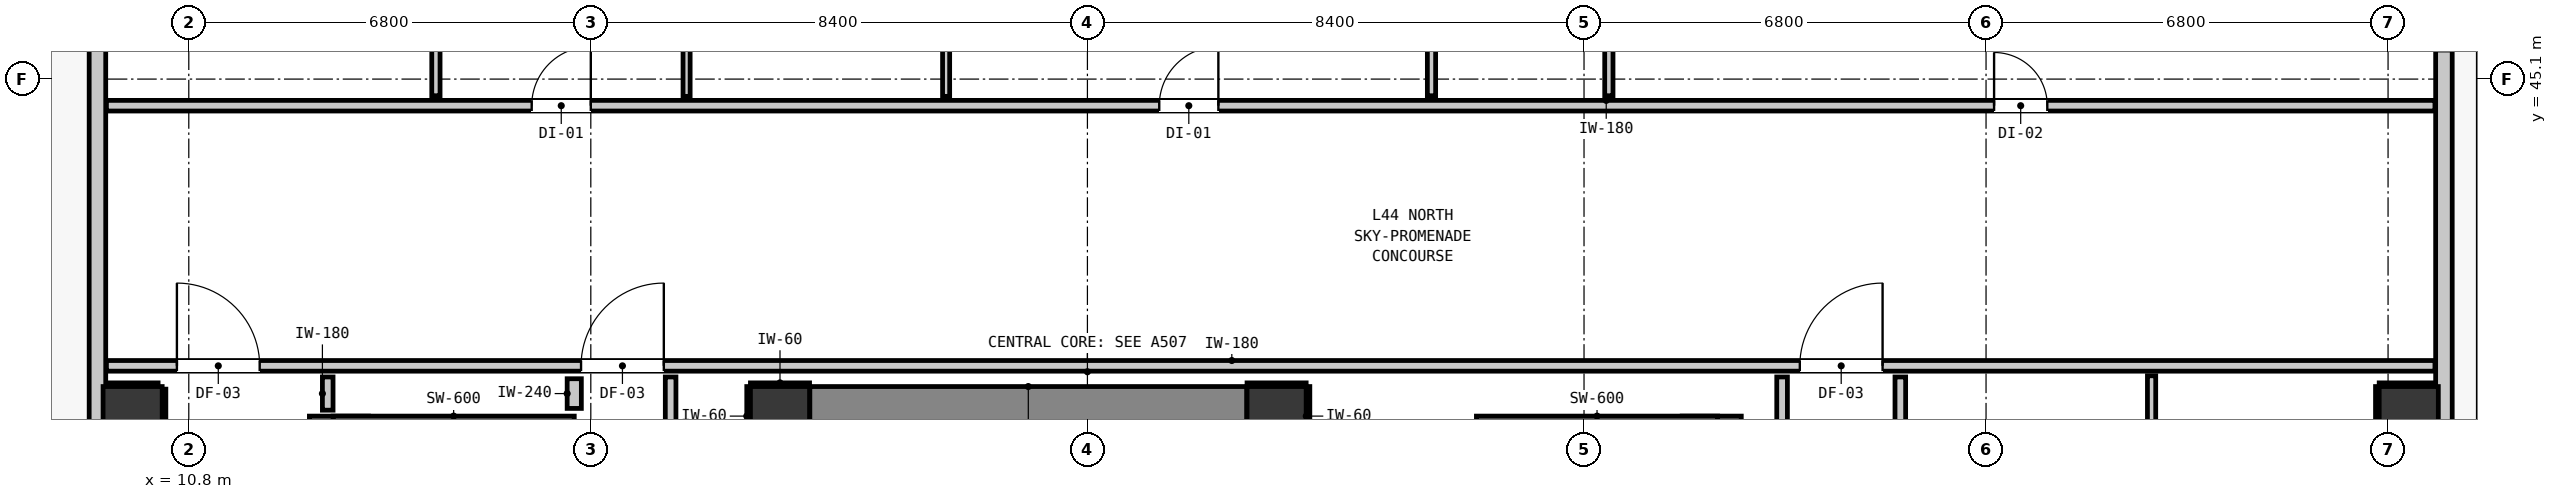
"""IFC4 building model, lengths in metres.
Left out: names, types, materials, properties, quantities, classifications, styles, units other than length and angle.
Written with IfcOpenShell. Run it as: python <this file> out.ifc"""

import sys

from ifc_helpers import new_model, si_unit, direction, frame, frame_2d, origin, origin_2d, place, context, subcontext, project, spatial, rectangle, extrude, element, fill, save


model = new_model("IFC4")
c1 = context("Model", 3, precision=1e-05, world=origin(), true_north=direction((0.0, 1.0)))
c2 = subcontext(c1, "Body", "Model", "MODEL_VIEW")
j1 = project(units=[si_unit("LENGTHUNIT", "METRE"), si_unit("PLANEANGLEUNIT", "RADIAN")], contexts=[c1])
p1 = place(None, origin())
s1 = spatial("IfcSite", under=j1, at=p1, CompositionType="ELEMENT")
p2 = place(p1, origin())
s2 = spatial("IfcBuilding", under=s1, at=p2, CompositionType="ELEMENT")
p3 = place(p2, frame((0.0, 0.0, 152.56)))
s3 = spatial("IfcBuildingStorey", under=s2, at=p3, CompositionType="ELEMENT", Elevation=152.56)
for number, where, z_axis, x_axis in (
    (1, (20.8, 39.4, 0.0), (0.0, 0.0, 1.0), (1.0, 0.0, 0.0)),
    (2, (29.2, 39.4, 0.0), (0.0, 0.0, 1.0), (1.0, 0.0, 0.0)),
):
    element("IfcColumn", number, at=place(p3, frame(where, z_axis=z_axis, x_axis=x_axis)), inside=s3, PredefinedType="COLUMN", context=c2, shape_type="SweptSolid", body=[
        extrude(rectangle(XDim=1.0, YDim=1.0, at=origin_2d()), origin(), (0.0, 0.0, 1.0), 3.32),
    ])
p4 = place(p3, frame((13.34, 31.205, 0.0), z_axis=(0.0, 0.0, 1.0), x_axis=(0.0, 1.0, 0.0)))
e3 = element("IfcWall", 3, at=p4, inside=s3, PredefinedType="SHEAR", context=c2, shape_type="SweptSolid", body=[
    extrude(rectangle(XDim=8.195, YDim=1.0, at=frame_2d((4.097, 0.0))), origin(), (0.0, 0.0, 1.0), 3.32),
])
p5 = place(p3, frame((13.24, 39.1, 0.0), z_axis=(0.0, 0.0, 1.0), x_axis=(1.0, 0.0, 0.0)))
e4 = element("IfcWall", 4, at=p5, inside=s3, PredefinedType="SHEAR", context=c2, shape_type="SweptSolid", body=[
    extrude(rectangle(XDim=4.08, YDim=0.6, at=frame_2d((2.04, 0.0))), origin(), (0.0, 0.0, 1.0), 3.32),
])
p6 = place(p3, frame((36.56, 31.205, 0.0), z_axis=(0.0, 0.0, 1.0), x_axis=(0.0, 1.0, 0.0)))
e5 = element("IfcWall", 5, at=p6, inside=s3, PredefinedType="SHEAR", context=c2, shape_type="SweptSolid", body=[
    extrude(rectangle(XDim=8.195, YDim=1.0, at=frame_2d((4.097, 0.0))), origin(), (0.0, 0.0, 1.0), 3.32),
])
p7 = place(p3, frame((32.58, 39.1, 0.0), z_axis=(0.0, 0.0, 1.0), x_axis=(1.0, 0.0, 0.0)))
e6 = element("IfcWall", 6, at=p7, inside=s3, PredefinedType="SHEAR", context=c2, shape_type="SweptSolid", body=[
    extrude(rectangle(XDim=4.08, YDim=0.6, at=frame_2d((2.04, 0.0))), origin(), (0.0, 0.0, 1.0), 3.32),
])
p8 = place(p3, frame((21.305, 39.4, 0.0), z_axis=(0.0, 0.0, 1.0), x_axis=(1.0, 0.0, 0.0)))
e7 = element("IfcWall", 7, at=p8, inside=s3, PredefinedType="SHEAR", context=c2, shape_type="SweptSolid", body=[
    extrude(rectangle(XDim=7.39, YDim=1.0, at=frame_2d((3.695, 0.0))), origin(), (0.0, 0.0, 1.0), 3.32),
])
for number, where, z_axis, x_axis in (
    (8, (9.85, 39.4, 0.0), (0.0, 0.0, 1.0), (1.0, 0.0, 0.0)),
    (9, (48.35, 39.4, 0.0), (0.0, 0.0, 1.0), (1.0, 0.0, 0.0)),
):
    element("IfcColumn", number, at=place(p3, frame(where, z_axis=z_axis, x_axis=x_axis)), inside=s3, PredefinedType="COLUMN", context=c2, shape_type="SweptSolid", body=[
        extrude(rectangle(XDim=1.0, YDim=1.0, at=origin_2d()), origin(), (0.0, 0.0, 1.0), 3.32),
    ])
p9 = place(p3, frame((9.255, 17.555, 0.0), z_axis=(0.0, 0.0, 1.0), x_axis=(0.0, 1.0, 0.0)))
e10 = element("IfcWall", 10, at=p9, inside=s3, PredefinedType="STANDARD", context=c2, shape_type="SweptSolid", body=[
    extrude(rectangle(XDim=32.29, YDim=0.28, at=frame_2d((16.145, 0.0))), origin(), (0.0, 0.0, 1.0), 3.08),
])
p10 = place(p9, frame((5.467, 0.0, 0.0)))
e11 = element("IfcOpeningElement", 11, at=p10, cuts=e10, PredefinedType="OPENING", context=c2, shape_type="SweptSolid", body=[
    extrude(rectangle(XDim=1.0, YDim=2.15, at=frame_2d((0.5, 1.075))), frame((0.0, 0.15, 0.0), z_axis=(0.0, -1.0, 0.0), x_axis=(1.0, 0.0, 0.0)), (0.0, 0.0, 1.0), 0.3),
])
p11 = place(p9, frame((30.602, 0.0, 0.85)))
e12 = element("IfcOpeningElement", 12, at=p11, cuts=e10, PredefinedType="OPENING", context=c2, shape_type="SweptSolid", body=[
    extrude(rectangle(XDim=1.35, YDim=1.85, at=frame_2d((0.675, 0.925))), frame((0.0, 0.15, 0.0), z_axis=(0.0, -1.0, 0.0), x_axis=(1.0, 0.0, 0.0)), (0.0, 0.0, 1.0), 0.3),
])
p12 = place(p3, frame((48.945, 49.845, 0.0), z_axis=(0.0, 0.0, 1.0), x_axis=(0.0, -1.0, 0.0)))
e13 = element("IfcWall", 13, at=p12, inside=s3, PredefinedType="STANDARD", context=c2, shape_type="SweptSolid", body=[
    extrude(rectangle(XDim=32.29, YDim=0.28, at=frame_2d((16.145, 0.0))), origin(), (0.0, 0.0, 1.0), 3.08),
])
p13 = place(p12, frame((0.904, 0.0, 0.0)))
e14 = element("IfcOpeningElement", 14, at=p13, cuts=e13, PredefinedType="OPENING", context=c2, shape_type="SweptSolid", body=[
    extrude(rectangle(XDim=1.0, YDim=2.15, at=frame_2d((0.5, 1.075))), frame((0.0, 0.15, 0.0), z_axis=(0.0, -1.0, 0.0), x_axis=(1.0, 0.0, 0.0)), (0.0, 0.0, 1.0), 0.3),
])
p14 = place(p12, frame((2.924, 0.0, 0.85)))
e15 = element("IfcOpeningElement", 15, at=p14, cuts=e13, PredefinedType="OPENING", context=c2, shape_type="SweptSolid", body=[
    extrude(rectangle(XDim=1.35, YDim=1.85, at=frame_2d((0.675, 0.925))), frame((0.0, 0.15, 0.0), z_axis=(0.0, -1.0, 0.0), x_axis=(1.0, 0.0, 0.0)), (0.0, 0.0, 1.0), 0.3),
])
p15 = place(p12, frame((21.186, 0.0, 0.85)))
e16 = element("IfcOpeningElement", 16, at=p15, cuts=e13, PredefinedType="OPENING", context=c2, shape_type="SweptSolid", body=[
    extrude(rectangle(XDim=1.35, YDim=1.85, at=frame_2d((0.675, 0.925))), frame((0.0, 0.15, 0.0), z_axis=(0.0, -1.0, 0.0), x_axis=(1.0, 0.0, 0.0)), (0.0, 0.0, 1.0), 0.3),
])
p16 = place(p12, frame((12.195, 0.0, 0.85)))
e17 = element("IfcOpeningElement", 17, at=p16, cuts=e13, PredefinedType="OPENING", context=c2, shape_type="SweptSolid", body=[
    extrude(rectangle(XDim=1.35, YDim=1.85, at=frame_2d((0.675, 0.925))), frame((0.0, 0.15, 0.0), z_axis=(0.0, -1.0, 0.0), x_axis=(1.0, 0.0, 0.0)), (0.0, 0.0, 1.0), 0.3),
])
p17 = place(p3, frame((9.407, 40.25, 0.0), z_axis=(0.0, 0.0, 1.0), x_axis=(1.0, 0.0, 0.0)))
e18 = element("IfcWall", 18, at=p17, inside=s3, PredefinedType="PARTITIONING", context=c2, shape_type="SweptSolid", body=[
    extrude(rectangle(XDim=39.386, YDim=0.18, at=frame_2d((19.693, 0.0))), origin(), (0.0, 0.0, 1.0), 3.08),
])
p18 = place(p17, frame((8.028, 0.0, 0.0)))
e19 = element("IfcOpeningElement", 19, at=p18, cuts=e18, PredefinedType="OPENING", context=c2, shape_type="SweptSolid", body=[
    extrude(rectangle(XDim=1.4, YDim=2.15, at=frame_2d((0.7, 1.075))), frame((0.0, 0.1, 0.0), z_axis=(0.0, -1.0, 0.0), x_axis=(1.0, 0.0, 0.0)), (0.0, 0.0, 1.0), 0.2),
])
p19 = place(p17, frame((1.192, 0.0, 0.0)))
e20 = element("IfcOpeningElement", 20, at=p19, cuts=e18, PredefinedType="OPENING", context=c2, shape_type="SweptSolid", body=[
    extrude(rectangle(XDim=1.4, YDim=2.15, at=frame_2d((0.7, 1.075))), frame((0.0, 0.1, 0.0), z_axis=(0.0, -1.0, 0.0), x_axis=(1.0, 0.0, 0.0)), (0.0, 0.0, 1.0), 0.2),
])
p20 = place(p17, frame((28.643, 0.0, 0.0)))
e21 = element("IfcOpeningElement", 21, at=p20, cuts=e18, PredefinedType="OPENING", context=c2, shape_type="SweptSolid", body=[
    extrude(rectangle(XDim=1.4, YDim=2.15, at=frame_2d((0.7, 1.075))), frame((0.0, 0.1, 0.0), z_axis=(0.0, -1.0, 0.0), x_axis=(1.0, 0.0, 0.0)), (0.0, 0.0, 1.0), 0.2),
])
p21 = place(p3, frame((9.407, 44.65, 0.0), z_axis=(0.0, 0.0, 1.0), x_axis=(1.0, 0.0, 0.0)))
e22 = element("IfcWall", 22, at=p21, inside=s3, PredefinedType="PARTITIONING", context=c2, shape_type="SweptSolid", body=[
    extrude(rectangle(XDim=39.386, YDim=0.18, at=frame_2d((19.693, 0.0))), origin(), (0.0, 0.0, 1.0), 3.08),
])
p22 = place(p21, frame((7.193, 0.0, 0.0)))
e23 = element("IfcOpeningElement", 23, at=p22, cuts=e22, PredefinedType="OPENING", context=c2, shape_type="SweptSolid", body=[
    extrude(rectangle(XDim=1.0, YDim=2.15, at=frame_2d((0.5, 1.075))), frame((0.0, 0.1, 0.0), z_axis=(0.0, -1.0, 0.0), x_axis=(1.0, 0.0, 0.0)), (0.0, 0.0, 1.0), 0.2),
])
p23 = place(p21, frame((17.808, 0.0, 0.0)))
e24 = element("IfcOpeningElement", 24, at=p23, cuts=e22, PredefinedType="OPENING", context=c2, shape_type="SweptSolid", body=[
    extrude(rectangle(XDim=1.0, YDim=2.15, at=frame_2d((0.5, 1.075))), frame((0.0, 0.1, 0.0), z_axis=(0.0, -1.0, 0.0), x_axis=(1.0, 0.0, 0.0)), (0.0, 0.0, 1.0), 0.2),
])
p24 = place(p21, frame((31.929, 0.0, 0.0)))
e25 = element("IfcOpeningElement", 25, at=p24, cuts=e22, PredefinedType="OPENING", context=c2, shape_type="SweptSolid", body=[
    extrude(rectangle(XDim=0.9, YDim=2.1, at=frame_2d((0.45, 1.05))), frame((0.0, 0.1, 0.0), z_axis=(0.0, -1.0, 0.0), x_axis=(1.0, 0.0, 0.0)), (0.0, 0.0, 1.0), 0.2),
])
p25 = place(p3, frame((17.32, 39.53, 0.0), z_axis=(0.0, 0.0, 1.0), x_axis=(0.0, 1.0, 0.0)))
e26 = element("IfcWall", 26, at=p25, inside=s3, PredefinedType="PARTITIONING", context=c2, shape_type="SweptSolid", body=[
    extrude(rectangle(XDim=0.502, YDim=0.24, at=frame_2d((0.251, 0.0))), origin(), (0.0, 0.0, 1.0), 3.08),
])
p26 = place(p3, frame((13.15, 39.5, 0.0), z_axis=(0.0, 0.0, 1.0), x_axis=(0.0, 1.0, 0.0)))
e27 = element("IfcWall", 27, at=p26, inside=s3, PredefinedType="PARTITIONING", context=c2, shape_type="SweptSolid", body=[
    extrude(rectangle(XDim=0.562, YDim=0.18, at=frame_2d((0.281, 0.0))), origin(), (0.0, 0.0, 1.0), 2.315),
])
p27 = place(p3, frame((18.95, 39.058, 0.0), z_axis=(0.0, 0.0, 1.0), x_axis=(0.0, 1.0, 0.0)))
e28 = element("IfcWall", 28, at=p27, inside=s3, PredefinedType="PARTITIONING", context=c2, shape_type="SweptSolid", body=[
    extrude(rectangle(XDim=1.004, YDim=0.18, at=frame_2d((0.502, 0.0))), origin(), (0.0, 0.0, 1.0), 3.08),
])
p28 = place(p3, frame((37.75, 21.368, 0.0), z_axis=(0.0, 0.0, 1.0), x_axis=(0.0, 1.0, 0.0)))
e29 = element("IfcWall", 29, at=p28, inside=s3, PredefinedType="PARTITIONING", context=c2, shape_type="SweptSolid", body=[
    extrude(rectangle(XDim=18.694, YDim=0.18, at=frame_2d((9.347, 0.0))), origin(), (0.0, 0.0, 1.0), 3.08),
])
p29 = place(p3, frame((39.75, 35.118, 0.0), z_axis=(0.0, 0.0, 1.0), x_axis=(0.0, 1.0, 0.0)))
e30 = element("IfcWall", 30, at=p29, inside=s3, PredefinedType="PARTITIONING", context=c2, shape_type="SweptSolid", body=[
    extrude(rectangle(XDim=4.944, YDim=0.18, at=frame_2d((2.472, 0.0))), origin(), (0.0, 0.0, 1.0), 3.08),
])
p30 = place(p3, frame((14.98, 44.818, 0.0), z_axis=(0.0, 0.0, 1.0), x_axis=(0.0, 1.0, 0.0)))
e31 = element("IfcWall", 31, at=p30, inside=s3, PredefinedType="PARTITIONING", context=c2, shape_type="SweptSolid", body=[
    extrude(rectangle(XDim=2.844, YDim=0.14, at=frame_2d((1.422, 0.0))), origin(), (0.0, 0.0, 1.0), 3.08),
])
p31 = place(p30, frame((0.995, 0.0, 0.0)))
e32 = element("IfcOpeningElement", 32, at=p31, cuts=e31, PredefinedType="OPENING", context=c2, shape_type="SweptSolid", body=[
    extrude(rectangle(XDim=0.86, YDim=2.02, at=frame_2d((0.43, 1.01))), frame((0.0, 0.08, 0.0), z_axis=(0.0, -1.0, 0.0), x_axis=(1.0, 0.0, 0.0)), (0.0, 0.0, 1.0), 0.16),
])
p32 = place(p3, frame((31.82, 44.818, 0.0), z_axis=(0.0, 0.0, 1.0), x_axis=(0.0, 1.0, 0.0)))
e33 = element("IfcWall", 33, at=p32, inside=s3, PredefinedType="PARTITIONING", context=c2, shape_type="SweptSolid", body=[
    extrude(rectangle(XDim=2.844, YDim=0.14, at=frame_2d((1.422, 0.0))), origin(), (0.0, 0.0, 1.0), 3.08),
])
p33 = place(p32, frame((0.975, 0.0, 0.0)))
e34 = element("IfcOpeningElement", 34, at=p33, cuts=e33, PredefinedType="OPENING", context=c2, shape_type="SweptSolid", body=[
    extrude(rectangle(XDim=0.9, YDim=2.1, at=frame_2d((0.45, 1.05))), frame((0.0, 0.08, 0.0), z_axis=(0.0, -1.0, 0.0), x_axis=(1.0, 0.0, 0.0)), (0.0, 0.0, 1.0), 0.16),
])
p34 = place(p3, frame((34.82, 44.818, 0.0), z_axis=(0.0, 0.0, 1.0), x_axis=(0.0, 1.0, 0.0)))
e35 = element("IfcWall", 35, at=p34, inside=s3, PredefinedType="PARTITIONING", context=c2, shape_type="SweptSolid", body=[
    extrude(rectangle(XDim=2.844, YDim=0.14, at=frame_2d((1.422, 0.0))), origin(), (0.0, 0.0, 1.0), 3.08),
])
p35 = place(p3, frame((44.0, 35.098, 0.0), z_axis=(0.0, 0.0, 1.0), x_axis=(0.0, 1.0, 0.0)))
e36 = element("IfcWall", 36, at=p35, inside=s3, PredefinedType="PARTITIONING", context=c2, shape_type="SweptSolid", body=[
    extrude(rectangle(XDim=4.984, YDim=0.14, at=frame_2d((2.492, 0.0))), origin(), (0.0, 0.0, 1.0), 3.08),
])
p36 = place(p3, frame((19.22, 44.808, 0.0), z_axis=(0.0, 0.0, 1.0), x_axis=(0.0, 1.0, 0.0)))
e37 = element("IfcWall", 37, at=p36, inside=s3, PredefinedType="PARTITIONING", context=c2, shape_type="SweptSolid", body=[
    extrude(rectangle(XDim=7.185, YDim=0.12, at=frame_2d((3.592, 0.0))), origin(), (0.0, 0.0, 1.0), 3.08),
])
p37 = place(p36, frame((3.067, 0.0, 0.0)))
e38 = element("IfcOpeningElement", 38, at=p37, cuts=e37, PredefinedType="OPENING", context=c2, shape_type="SweptSolid", body=[
    extrude(rectangle(XDim=0.9, YDim=2.1, at=frame_2d((0.45, 1.05))), frame((0.0, 0.07, 0.0), z_axis=(0.0, -1.0, 0.0), x_axis=(1.0, 0.0, 0.0)), (0.0, 0.0, 1.0), 0.14),
])
p38 = place(p3, frame((23.61, 44.808, 0.0), z_axis=(0.0, 0.0, 1.0), x_axis=(0.0, 1.0, 0.0)))
e39 = element("IfcWall", 39, at=p38, inside=s3, PredefinedType="PARTITIONING", context=c2, shape_type="SweptSolid", body=[
    extrude(rectangle(XDim=7.185, YDim=0.12, at=frame_2d((3.592, 0.0))), origin(), (0.0, 0.0, 1.0), 3.08),
])
for number, where, z_axis, x_axis in (
    (40, (20.3, 39.932, 0.0), (0.0, 0.0, 1.0), (1.0, 0.0, 0.0)),
    (41, (20.268, 38.9, 0.0), (0.0, 0.0, 1.0), (0.0, 1.0, 0.0)),
    (42, (28.7, 39.932, 0.0), (0.0, 0.0, 1.0), (1.0, 0.0, 0.0)),
    (43, (29.732, 38.9, 0.0), (0.0, 0.0, 1.0), (0.0, 1.0, 0.0)),
):
    element("IfcWall", number, at=place(p3, frame(where, z_axis=z_axis, x_axis=x_axis)), inside=s3, PredefinedType="PARTITIONING", context=c2, shape_type="SweptSolid", body=[
        extrude(rectangle(XDim=1.0, YDim=0.06, at=frame_2d((0.5, 0.0))), origin(), (0.0, 0.0, 1.0), 1.45),
    ])
p39 = place(p3, frame((9.41, 39.932, 0.0), z_axis=(0.0, 0.0, 1.0), x_axis=(1.0, 0.0, 0.0)))
e44 = element("IfcWall", 44, at=p39, inside=s3, PredefinedType="PARTITIONING", context=c2, shape_type="SweptSolid", body=[
    extrude(rectangle(XDim=0.871, YDim=0.06, at=frame_2d((0.436, 0.0))), origin(), (0.0, 0.0, 1.0), 1.45),
])
p40 = place(p3, frame((10.382, 38.9, 0.0), z_axis=(0.0, 0.0, 1.0), x_axis=(0.0, 1.0, 0.0)))
e45 = element("IfcWall", 45, at=p40, inside=s3, PredefinedType="PARTITIONING", context=c2, shape_type="SweptSolid", body=[
    extrude(rectangle(XDim=0.956, YDim=0.06, at=frame_2d((0.478, 0.0))), origin(), (0.0, 0.0, 1.0), 1.45),
])
p41 = place(p3, frame((47.85, 39.932, 0.0), z_axis=(0.0, 0.0, 1.0), x_axis=(1.0, 0.0, 0.0)))
e46 = element("IfcWall", 46, at=p41, inside=s3, PredefinedType="PARTITIONING", context=c2, shape_type="SweptSolid", body=[
    extrude(rectangle(XDim=0.94, YDim=0.06, at=frame_2d((0.47, 0.0))), origin(), (0.0, 0.0, 1.0), 1.45),
])
p42 = place(p3, frame((47.818, 38.9, 0.0), z_axis=(0.0, 0.0, 1.0), x_axis=(0.0, 1.0, 0.0)))
e47 = element("IfcWall", 47, at=p42, inside=s3, PredefinedType="PARTITIONING", context=c2, shape_type="SweptSolid", body=[
    extrude(rectangle(XDim=1.0, YDim=0.06, at=frame_2d((0.5, 0.0))), origin(), (0.0, 0.0, 1.0), 1.45),
])
p43 = place(p18, origin())
e48 = element("IfcDoor", 48, at=p43, inside=s3, OperationType="SINGLE_SWING_RIGHT", PredefinedType="DOOR", context=c2, shape_type="SweptSolid", body=[
    extrude(rectangle(XDim=1.4, YDim=2.15, at=frame_2d((0.7, 1.075))), frame((0.0, 0.025, 0.0), z_axis=(0.0, -1.0, 0.0), x_axis=(1.0, 0.0, 0.0)), (0.0, 0.0, 1.0), 0.05),
])
fill(e19, e48)
p44 = place(p19, origin())
e49 = element("IfcDoor", 49, at=p44, inside=s3, OperationType="SINGLE_SWING_LEFT", PredefinedType="DOOR", context=c2, shape_type="SweptSolid", body=[
    extrude(rectangle(XDim=1.4, YDim=2.15, at=frame_2d((0.7, 1.075))), frame((0.0, 0.025, 0.0), z_axis=(0.0, -1.0, 0.0), x_axis=(1.0, 0.0, 0.0)), (0.0, 0.0, 1.0), 0.05),
])
fill(e20, e49)
p45 = place(p20, origin())
e50 = element("IfcDoor", 50, at=p45, inside=s3, OperationType="SINGLE_SWING_RIGHT", PredefinedType="DOOR", context=c2, shape_type="SweptSolid", body=[
    extrude(rectangle(XDim=1.4, YDim=2.15, at=frame_2d((0.7, 1.075))), frame((0.0, 0.025, 0.0), z_axis=(0.0, -1.0, 0.0), x_axis=(1.0, 0.0, 0.0)), (0.0, 0.0, 1.0), 0.05),
])
fill(e21, e50)
p46 = place(p22, origin())
e51 = element("IfcDoor", 51, at=p46, inside=s3, OperationType="SINGLE_SWING_RIGHT", PredefinedType="DOOR", context=c2, shape_type="SweptSolid", body=[
    extrude(rectangle(XDim=1.0, YDim=2.15, at=frame_2d((0.5, 1.075))), frame((0.0, 0.025, 0.0), z_axis=(0.0, -1.0, 0.0), x_axis=(1.0, 0.0, 0.0)), (0.0, 0.0, 1.0), 0.05),
])
fill(e23, e51)
p47 = place(p23, origin())
e52 = element("IfcDoor", 52, at=p47, inside=s3, OperationType="SINGLE_SWING_RIGHT", PredefinedType="DOOR", context=c2, shape_type="SweptSolid", body=[
    extrude(rectangle(XDim=1.0, YDim=2.15, at=frame_2d((0.5, 1.075))), frame((0.0, 0.025, 0.0), z_axis=(0.0, -1.0, 0.0), x_axis=(1.0, 0.0, 0.0)), (0.0, 0.0, 1.0), 0.05),
])
fill(e24, e52)
p48 = place(p24, origin())
e53 = element("IfcDoor", 53, at=p48, inside=s3, OperationType="SINGLE_SWING_LEFT", PredefinedType="DOOR", context=c2, shape_type="SweptSolid", body=[
    extrude(rectangle(XDim=0.9, YDim=2.1, at=frame_2d((0.45, 1.05))), frame((0.0, 0.025, 0.0), z_axis=(0.0, -1.0, 0.0), x_axis=(1.0, 0.0, 0.0)), (0.0, 0.0, 1.0), 0.05),
])
fill(e25, e53)
save(model, sys.argv[1])
